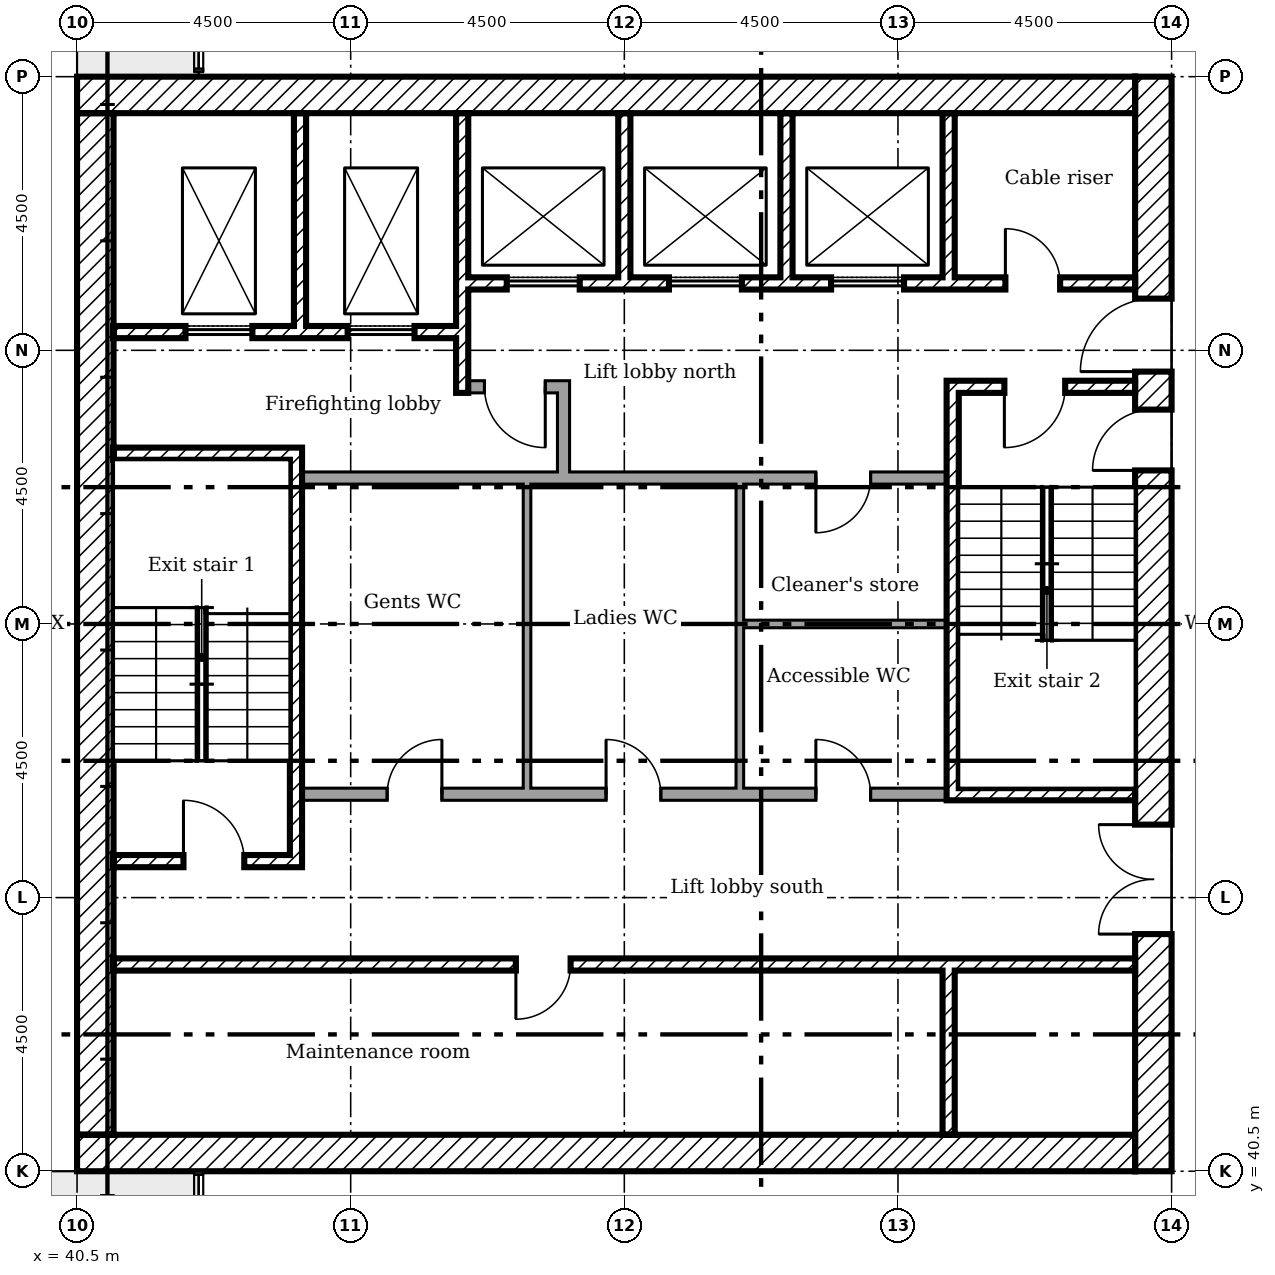
"""IFC4 building model, lengths in metres.
Left out: names, types, materials, properties, quantities, classifications, styles, units other than length and angle.
Written with IfcOpenShell. Run it as: python <this file> out.ifc"""

import sys

from ifc_helpers import new_model, si_unit, direction, frame, frame_2d, origin, place, context, subcontext, project, spatial, rectangle, extrude, element, fill, save


model = new_model("IFC4")
c1 = context("Model", 3, precision=1e-05, world=origin(), true_north=direction((0.0, 1.0)))
c2 = subcontext(c1, "Body", "Model", "MODEL_VIEW")
j1 = project(units=[si_unit("LENGTHUNIT", "METRE"), si_unit("PLANEANGLEUNIT", "RADIAN")], contexts=[c1])
p1 = place(None, origin())
s1 = spatial("IfcSite", under=j1, at=p1, CompositionType="ELEMENT")
p2 = place(p1, origin())
s2 = spatial("IfcBuilding", under=s1, at=p2, CompositionType="ELEMENT")
p3 = place(p2, frame((0.0, 0.0, 147.4)))
s3 = spatial("IfcBuildingStorey", under=s2, at=p3, CompositionType="ELEMENT", Elevation=147.4)
p4 = place(p3, frame((58.2, 40.5, 0.0), z_axis=(0.0, 0.0, 1.0), x_axis=(0.0, 1.0, 0.0)))
e1 = element("IfcWall", 1, at=p4, inside=s3, PredefinedType="SHEAR", context=c2, shape_type="SweptSolid", body=[
    extrude(rectangle(XDim=18.0, YDim=0.6, at=frame_2d((9.0, 0.0))), origin(), (0.0, 0.0, 1.0), 3.35),
])
p5 = place(p4, frame((13.15, 0.0, 0.0)))
e2 = element("IfcOpeningElement", 2, at=p5, cuts=e1, PredefinedType="OPENING", context=c2, shape_type="SweptSolid", body=[
    extrude(rectangle(XDim=1.2, YDim=2.1, at=frame_2d((0.6, 1.05))), frame((0.0, 0.31, 0.0), z_axis=(0.0, -1.0, 0.0), x_axis=(1.0, 0.0, 0.0)), (0.0, 0.0, 1.0), 0.62),
])
p6 = place(p4, frame((3.9, 0.0, 0.0)))
e3 = element("IfcOpeningElement", 3, at=p6, cuts=e1, PredefinedType="OPENING", context=c2, shape_type="SweptSolid", body=[
    extrude(rectangle(XDim=1.8, YDim=2.1, at=frame_2d((0.9, 1.05))), frame((0.0, 0.31, 0.0), z_axis=(0.0, -1.0, 0.0), x_axis=(1.0, 0.0, 0.0)), (0.0, 0.0, 1.0), 0.62),
])
p7 = place(p4, frame((11.525, 0.0, 0.0)))
e4 = element("IfcOpeningElement", 4, at=p7, cuts=e1, PredefinedType="OPENING", context=c2, shape_type="SweptSolid", body=[
    extrude(rectangle(XDim=1.0, YDim=2.1, at=frame_2d((0.5, 1.05))), frame((0.0, 0.31, 0.0), z_axis=(0.0, -1.0, 0.0), x_axis=(1.0, 0.0, 0.0)), (0.0, 0.0, 1.0), 0.62),
])
for number, where in (
    (5, (40.5, 58.2, 0.0)),
    (6, (40.5, 40.8, 0.0)),
):
    element("IfcWall", number, at=place(p3, frame(where)), inside=s3, PredefinedType="SHEAR", context=c2, shape_type="SweptSolid", body=[
        extrude(rectangle(XDim=17.4, YDim=0.6, at=frame_2d((8.7, 0.0))), origin(), (0.0, 0.0, 1.0), 3.35),
    ])
p8 = place(p3, frame((40.8, 41.1, 0.0), z_axis=(0.0, 0.0, 1.0), x_axis=(0.0, 1.0, 0.0)))
e7 = element("IfcWall", 7, at=p8, inside=s3, PredefinedType="SHEAR", context=c2, shape_type="SweptSolid", body=[
    extrude(rectangle(XDim=16.8, YDim=0.6, at=frame_2d((8.4, 0.0))), origin(), (0.0, 0.0, 1.0), 3.35),
])
p9 = place(p3, frame((44.167, 57.9, 0.0), z_axis=(0.0, 0.0, 1.0), x_axis=(0.0, -1.0, 0.0)))
e8 = element("IfcWall", 8, at=p9, inside=s3, PredefinedType="SHEAR", context=c2, shape_type="SweptSolid", body=[
    extrude(rectangle(XDim=3.5, YDim=0.2, at=frame_2d((1.75, 0.0))), origin(), (0.0, 0.0, 1.0), 3.35),
])
p10 = place(p3, frame((46.833, 57.9, 0.0), z_axis=(0.0, 0.0, 1.0), x_axis=(0.0, -1.0, 0.0)))
e9 = element("IfcWall", 9, at=p10, inside=s3, PredefinedType="SHEAR", context=c2, shape_type="SweptSolid", body=[
    extrude(rectangle(XDim=4.6, YDim=0.2, at=frame_2d((2.3, 0.0))), origin(), (0.0, 0.0, 1.0), 3.35),
])
for number, where, z_axis, x_axis in (
    (10, (49.5, 57.9, 0.0), (0.0, 0.0, 1.0), (0.0, -1.0, 0.0)),
    (11, (52.167, 57.9, 0.0), (0.0, 0.0, 1.0), (0.0, -1.0, 0.0)),
    (12, (54.833, 57.9, 0.0), (0.0, 0.0, 1.0), (0.0, -1.0, 0.0)),
    (13, (54.833, 41.1, 0.0), (0.0, 0.0, 1.0), (0.0, 1.0, 0.0)),
):
    element("IfcWall", number, at=place(p3, frame(where, z_axis=z_axis, x_axis=x_axis)), inside=s3, PredefinedType="SHEAR", context=c2, shape_type="SweptSolid", body=[
        extrude(rectangle(XDim=2.7, YDim=0.2, at=frame_2d((1.35, 0.0))), origin(), (0.0, 0.0, 1.0), 3.35),
    ])
p11 = place(p3, frame((48.5, 51.9, 0.0), z_axis=(0.0, 0.0, 1.0), x_axis=(0.0, 1.0, 0.0)))
e14 = element("IfcWall", 14, at=p11, inside=s3, PredefinedType="PARTITIONING", context=c2, shape_type="SweptSolid", body=[
    extrude(rectangle(XDim=1.6, YDim=0.2, at=frame_2d((0.8, 0.0))), origin(), (0.0, 0.0, 1.0), 3.35),
])
p12 = place(p3, frame((46.933, 53.4, 0.0)))
e15 = element("IfcWall", 15, at=p12, inside=s3, PredefinedType="PARTITIONING", context=c2, shape_type="SweptSolid", body=[
    extrude(rectangle(XDim=1.467, YDim=0.2, at=frame_2d((0.733, 0.0))), origin(), (0.0, 0.0, 1.0), 3.35),
])
p13 = place(p12, frame((0.267, 0.0, 0.0)))
e16 = element("IfcOpeningElement", 16, at=p13, cuts=e15, PredefinedType="OPENING", context=c2, shape_type="SweptSolid", body=[
    extrude(rectangle(XDim=1.0, YDim=2.1, at=frame_2d((0.5, 1.05))), frame((0.0, 0.11, 0.0), z_axis=(0.0, -1.0, 0.0), x_axis=(1.0, 0.0, 0.0)), (0.0, 0.0, 1.0), 0.22),
])
p14 = place(p3, frame((46.933, 55.1, 0.0)))
e17 = element("IfcWall", 17, at=p14, inside=s3, PredefinedType="SHEAR", context=c2, shape_type="SweptSolid", body=[
    extrude(rectangle(XDim=10.967, YDim=0.2, at=frame_2d((5.483, 0.0))), origin(), (0.0, 0.0, 1.0), 3.35),
])
p15 = place(p14, frame((8.833, 0.0, 0.0)))
e18 = element("IfcOpeningElement", 18, at=p15, cuts=e17, PredefinedType="OPENING", context=c2, shape_type="SweptSolid", body=[
    extrude(rectangle(XDim=0.9, YDim=2.1, at=frame_2d((0.45, 1.05))), frame((0.0, 0.11, 0.0), z_axis=(0.0, -1.0, 0.0), x_axis=(1.0, 0.0, 0.0)), (0.0, 0.0, 1.0), 0.22),
])
p16 = place(p14, frame((0.633, 0.0, 0.0)))
e19 = element("IfcOpeningElement", 19, at=p16, cuts=e17, PredefinedType="OPENING", context=c2, shape_type="SweptSolid", body=[
    extrude(rectangle(XDim=1.2, YDim=2.1, at=frame_2d((0.6, 1.05))), frame((0.0, 0.11, 0.0), z_axis=(0.0, -1.0, 0.0), x_axis=(1.0, 0.0, 0.0)), (0.0, 0.0, 1.0), 0.22),
])
p17 = place(p14, frame((3.3, 0.0, 0.0)))
e20 = element("IfcOpeningElement", 20, at=p17, cuts=e17, PredefinedType="OPENING", context=c2, shape_type="SweptSolid", body=[
    extrude(rectangle(XDim=1.2, YDim=2.1, at=frame_2d((0.6, 1.05))), frame((0.0, 0.11, 0.0), z_axis=(0.0, -1.0, 0.0), x_axis=(1.0, 0.0, 0.0)), (0.0, 0.0, 1.0), 0.22),
])
p18 = place(p14, frame((5.967, 0.0, 0.0)))
e21 = element("IfcOpeningElement", 21, at=p18, cuts=e17, PredefinedType="OPENING", context=c2, shape_type="SweptSolid", body=[
    extrude(rectangle(XDim=1.2, YDim=2.1, at=frame_2d((0.6, 1.05))), frame((0.0, 0.11, 0.0), z_axis=(0.0, -1.0, 0.0), x_axis=(1.0, 0.0, 0.0)), (0.0, 0.0, 1.0), 0.22),
])
p19 = place(p3, frame((41.1, 54.3, 0.0)))
e22 = element("IfcWall", 22, at=p19, inside=s3, PredefinedType="SHEAR", context=c2, shape_type="SweptSolid", body=[
    extrude(rectangle(XDim=5.633, YDim=0.2, at=frame_2d((2.817, 0.0))), origin(), (0.0, 0.0, 1.0), 3.35),
])
p20 = place(p19, frame((1.183, 0.0, 0.0)))
e23 = element("IfcOpeningElement", 23, at=p20, cuts=e22, PredefinedType="OPENING", context=c2, shape_type="SweptSolid", body=[
    extrude(rectangle(XDim=1.1, YDim=2.1, at=frame_2d((0.55, 1.05))), frame((0.0, 0.11, 0.0), z_axis=(0.0, -1.0, 0.0), x_axis=(1.0, 0.0, 0.0)), (0.0, 0.0, 1.0), 0.22),
])
p21 = place(p19, frame((3.85, 0.0, 0.0)))
e24 = element("IfcOpeningElement", 24, at=p21, cuts=e22, PredefinedType="OPENING", context=c2, shape_type="SweptSolid", body=[
    extrude(rectangle(XDim=1.1, YDim=2.1, at=frame_2d((0.55, 1.05))), frame((0.0, 0.11, 0.0), z_axis=(0.0, -1.0, 0.0), x_axis=(1.0, 0.0, 0.0)), (0.0, 0.0, 1.0), 0.22),
])
p22 = place(p3, frame((41.1, 43.9, 0.0)))
e25 = element("IfcWall", 25, at=p22, inside=s3, PredefinedType="SHEAR", context=c2, shape_type="SweptSolid", body=[
    extrude(rectangle(XDim=16.8, YDim=0.2, at=frame_2d((8.4, 0.0))), origin(), (0.0, 0.0, 1.0), 3.35),
])
p23 = place(p22, frame((6.617, 0.0, 0.0)))
e26 = element("IfcOpeningElement", 26, at=p23, cuts=e25, PredefinedType="OPENING", context=c2, shape_type="SweptSolid", body=[
    extrude(rectangle(XDim=0.9, YDim=2.1, at=frame_2d((0.45, 1.05))), frame((0.0, 0.11, 0.0), z_axis=(0.0, -1.0, 0.0), x_axis=(1.0, 0.0, 0.0)), (0.0, 0.0, 1.0), 0.22),
])
p24 = place(p3, frame((44.1, 45.5, 0.0), z_axis=(0.0, 0.0, 1.0), x_axis=(0.0, 1.0, 0.0)))
e27 = element("IfcWall", 27, at=p24, inside=s3, PredefinedType="SHEAR", context=c2, shape_type="SweptSolid", body=[
    extrude(rectangle(XDim=6.9, YDim=0.2, at=frame_2d((3.45, 0.0))), origin(), (0.0, 0.0, 1.0), 3.35),
])
p25 = place(p3, frame((41.1, 52.3, 0.0)))
e28 = element("IfcWall", 28, at=p25, inside=s3, PredefinedType="SHEAR", context=c2, shape_type="SweptSolid", body=[
    extrude(rectangle(XDim=2.9, YDim=0.2, at=frame_2d((1.45, 0.0))), origin(), (0.0, 0.0, 1.0), 3.35),
])
p26 = place(p3, frame((41.1, 45.6, 0.0)))
e29 = element("IfcWall", 29, at=p26, inside=s3, PredefinedType="SHEAR", context=c2, shape_type="SweptSolid", body=[
    extrude(rectangle(XDim=2.9, YDim=0.2, at=frame_2d((1.45, 0.0))), origin(), (0.0, 0.0, 1.0), 3.35),
])
p27 = place(p26, frame((1.15, 0.0, 0.0)))
e30 = element("IfcOpeningElement", 30, at=p27, cuts=e29, PredefinedType="OPENING", context=c2, shape_type="SweptSolid", body=[
    extrude(rectangle(XDim=1.0, YDim=2.1, at=frame_2d((0.5, 1.05))), frame((0.0, 0.11, 0.0), z_axis=(0.0, -1.0, 0.0), x_axis=(1.0, 0.0, 0.0)), (0.0, 0.0, 1.0), 0.22),
])
p28 = place(p3, frame((54.8, 53.4, 0.0)))
e31 = element("IfcWall", 31, at=p28, inside=s3, PredefinedType="SHEAR", context=c2, shape_type="SweptSolid", body=[
    extrude(rectangle(XDim=3.1, YDim=0.2, at=frame_2d((1.55, 0.0))), origin(), (0.0, 0.0, 1.0), 3.35),
])
p29 = place(p28, frame((0.95, 0.0, 0.0)))
e32 = element("IfcOpeningElement", 32, at=p29, cuts=e31, PredefinedType="OPENING", context=c2, shape_type="SweptSolid", body=[
    extrude(rectangle(XDim=1.0, YDim=2.1, at=frame_2d((0.5, 1.05))), frame((0.0, 0.11, 0.0), z_axis=(0.0, -1.0, 0.0), x_axis=(1.0, 0.0, 0.0)), (0.0, 0.0, 1.0), 0.22),
])
p30 = place(p3, frame((54.8, 46.7, 0.0)))
e33 = element("IfcWall", 33, at=p30, inside=s3, PredefinedType="SHEAR", context=c2, shape_type="SweptSolid", body=[
    extrude(rectangle(XDim=3.1, YDim=0.2, at=frame_2d((1.55, 0.0))), origin(), (0.0, 0.0, 1.0), 3.35),
])
p31 = place(p3, frame((54.9, 46.8, 0.0), z_axis=(0.0, 0.0, 1.0), x_axis=(0.0, 1.0, 0.0)))
e34 = element("IfcWall", 34, at=p31, inside=s3, PredefinedType="SHEAR", context=c2, shape_type="SweptSolid", body=[
    extrude(rectangle(XDim=6.5, YDim=0.2, at=frame_2d((3.25, 0.0))), origin(), (0.0, 0.0, 1.0), 3.35),
])
p32 = place(p3, frame((44.2, 51.9, 0.0)))
e35 = element("IfcWall", 35, at=p32, inside=s3, PredefinedType="PARTITIONING", context=c2, shape_type="SweptSolid", body=[
    extrude(rectangle(XDim=10.6, YDim=0.2, at=frame_2d((5.3, 0.0))), origin(), (0.0, 0.0, 1.0), 3.35),
])
p33 = place(p32, frame((8.45, 0.0, 0.0)))
e36 = element("IfcOpeningElement", 36, at=p33, cuts=e35, PredefinedType="OPENING", context=c2, shape_type="SweptSolid", body=[
    extrude(rectangle(XDim=0.9, YDim=2.1, at=frame_2d((0.45, 1.05))), frame((0.0, 0.11, 0.0), z_axis=(0.0, -1.0, 0.0), x_axis=(1.0, 0.0, 0.0)), (0.0, 0.0, 1.0), 0.22),
])
p34 = place(p3, frame((44.2, 46.7, 0.0)))
e37 = element("IfcWall", 37, at=p34, inside=s3, PredefinedType="PARTITIONING", context=c2, shape_type="SweptSolid", body=[
    extrude(rectangle(XDim=10.6, YDim=0.2, at=frame_2d((5.3, 0.0))), origin(), (0.0, 0.0, 1.0), 3.35),
])
p35 = place(p34, frame((1.4, 0.0, 0.0)))
e38 = element("IfcOpeningElement", 38, at=p35, cuts=e37, PredefinedType="OPENING", context=c2, shape_type="SweptSolid", body=[
    extrude(rectangle(XDim=0.9, YDim=2.1, at=frame_2d((0.45, 1.05))), frame((0.0, 0.11, 0.0), z_axis=(0.0, -1.0, 0.0), x_axis=(1.0, 0.0, 0.0)), (0.0, 0.0, 1.0), 0.22),
])
p36 = place(p34, frame((5.0, 0.0, 0.0)))
e39 = element("IfcOpeningElement", 39, at=p36, cuts=e37, PredefinedType="OPENING", context=c2, shape_type="SweptSolid", body=[
    extrude(rectangle(XDim=0.9, YDim=2.1, at=frame_2d((0.45, 1.05))), frame((0.0, 0.11, 0.0), z_axis=(0.0, -1.0, 0.0), x_axis=(1.0, 0.0, 0.0)), (0.0, 0.0, 1.0), 0.22),
])
p37 = place(p34, frame((8.45, 0.0, 0.0)))
e40 = element("IfcOpeningElement", 40, at=p37, cuts=e37, PredefinedType="OPENING", context=c2, shape_type="SweptSolid", body=[
    extrude(rectangle(XDim=0.9, YDim=2.1, at=frame_2d((0.45, 1.05))), frame((0.0, 0.11, 0.0), z_axis=(0.0, -1.0, 0.0), x_axis=(1.0, 0.0, 0.0)), (0.0, 0.0, 1.0), 0.22),
])
p38 = place(p3, frame((47.9, 46.8, 0.0), z_axis=(0.0, 0.0, 1.0), x_axis=(0.0, 1.0, 0.0)))
e41 = element("IfcWall", 41, at=p38, inside=s3, PredefinedType="PARTITIONING", context=c2, shape_type="SweptSolid", body=[
    extrude(rectangle(XDim=5.0, YDim=0.125, at=frame_2d((2.5, 0.0))), origin(), (0.0, 0.0, 1.0), 3.35),
])
p39 = place(p3, frame((51.4, 46.8, 0.0), z_axis=(0.0, 0.0, 1.0), x_axis=(0.0, 1.0, 0.0)))
e42 = element("IfcWall", 42, at=p39, inside=s3, PredefinedType="PARTITIONING", context=c2, shape_type="SweptSolid", body=[
    extrude(rectangle(XDim=2.762, YDim=0.125, at=frame_2d((1.381, 0.0))), origin(), (0.0, 0.0, 1.0), 3.35),
])
p40 = place(p3, frame((54.8, 49.5, 0.0), z_axis=(0.0, 0.0, 1.0), x_axis=(-1.0, 0.0, 0.0)))
e43 = element("IfcWall", 43, at=p40, inside=s3, PredefinedType="PARTITIONING", context=c2, shape_type="SweptSolid", body=[
    extrude(rectangle(XDim=3.338, YDim=0.125, at=frame_2d((1.669, 0.0))), origin(), (0.0, 0.0, 1.0), 3.35),
])
p41 = place(p3, frame((51.4, 49.5, 0.0), z_axis=(0.0, 0.0, 1.0), x_axis=(0.0, 1.0, 0.0)))
e44 = element("IfcWall", 44, at=p41, inside=s3, PredefinedType="PARTITIONING", context=c2, shape_type="SweptSolid", body=[
    extrude(rectangle(XDim=2.3, YDim=0.125, at=frame_2d((1.15, 0.0))), origin(), (0.0, 0.0, 1.0), 3.35),
])
p42 = place(p5, origin())
e45 = element("IfcDoor", 45, at=p42, inside=s3, OperationType="SINGLE_SWING_RIGHT", PredefinedType="DOOR", context=c2, shape_type="SweptSolid", body=[
    extrude(rectangle(XDim=1.2, YDim=2.1, at=frame_2d((0.6, 1.05))), frame((0.0, 0.025, 0.0), z_axis=(0.0, -1.0, 0.0), x_axis=(1.0, 0.0, 0.0)), (0.0, 0.0, 1.0), 0.05),
])
fill(e2, e45)
p43 = place(p6, origin())
e46 = element("IfcDoor", 46, at=p43, inside=s3, OperationType="DOUBLE_DOOR_SINGLE_SWING", PredefinedType="DOOR", context=c2, shape_type="SweptSolid", body=[
    extrude(rectangle(XDim=1.8, YDim=2.1, at=frame_2d((0.9, 1.05))), frame((0.0, 0.025, 0.0), z_axis=(0.0, -1.0, 0.0), x_axis=(1.0, 0.0, 0.0)), (0.0, 0.0, 1.0), 0.05),
])
fill(e3, e46)
p44 = place(p27, origin())
e47 = element("IfcDoor", 47, at=p44, inside=s3, OperationType="SINGLE_SWING_RIGHT", PredefinedType="DOOR", context=c2, shape_type="SweptSolid", body=[
    extrude(rectangle(XDim=1.0, YDim=2.1, at=frame_2d((0.5, 1.05))), frame((0.0, 0.025, 0.0), z_axis=(0.0, -1.0, 0.0), x_axis=(1.0, 0.0, 0.0)), (0.0, 0.0, 1.0), 0.05),
])
fill(e30, e47)
p45 = place(p29, frame((1.0, 0.0, 0.0), x_axis=(-1.0, 0.0, 0.0)))
e48 = element("IfcDoor", 48, at=p45, inside=s3, OperationType="SINGLE_SWING_LEFT", PredefinedType="DOOR", context=c2, shape_type="SweptSolid", body=[
    extrude(rectangle(XDim=1.0, YDim=2.1, at=frame_2d((0.5, 1.05))), frame((0.0, 0.025, 0.0), z_axis=(0.0, -1.0, 0.0), x_axis=(1.0, 0.0, 0.0)), (0.0, 0.0, 1.0), 0.05),
])
fill(e32, e48)
p46 = place(p7, origin())
e49 = element("IfcDoor", 49, at=p46, inside=s3, OperationType="SINGLE_SWING_RIGHT", PredefinedType="DOOR", context=c2, shape_type="SweptSolid", body=[
    extrude(rectangle(XDim=1.0, YDim=2.1, at=frame_2d((0.5, 1.05))), frame((0.0, 0.025, 0.0), z_axis=(0.0, -1.0, 0.0), x_axis=(1.0, 0.0, 0.0)), (0.0, 0.0, 1.0), 0.05),
])
fill(e4, e49)
p47 = place(p13, frame((1.0, 0.0, 0.0), x_axis=(-1.0, 0.0, 0.0)))
e50 = element("IfcDoor", 50, at=p47, inside=s3, OperationType="SINGLE_SWING_RIGHT", PredefinedType="DOOR", context=c2, shape_type="SweptSolid", body=[
    extrude(rectangle(XDim=1.0, YDim=2.1, at=frame_2d((0.5, 1.05))), frame((0.0, 0.025, 0.0), z_axis=(0.0, -1.0, 0.0), x_axis=(1.0, 0.0, 0.0)), (0.0, 0.0, 1.0), 0.05),
])
fill(e16, e50)
p48 = place(p15, origin())
e51 = element("IfcDoor", 51, at=p48, inside=s3, OperationType="SINGLE_SWING_RIGHT", PredefinedType="DOOR", context=c2, shape_type="SweptSolid", body=[
    extrude(rectangle(XDim=0.9, YDim=2.1, at=frame_2d((0.45, 1.05))), frame((0.0, 0.025, 0.0), z_axis=(0.0, -1.0, 0.0), x_axis=(1.0, 0.0, 0.0)), (0.0, 0.0, 1.0), 0.05),
])
fill(e18, e51)
p49 = place(p23, frame((0.9, 0.0, 0.0), x_axis=(-1.0, 0.0, 0.0)))
e52 = element("IfcDoor", 52, at=p49, inside=s3, OperationType="SINGLE_SWING_LEFT", PredefinedType="DOOR", context=c2, shape_type="SweptSolid", body=[
    extrude(rectangle(XDim=0.9, YDim=2.1, at=frame_2d((0.45, 1.05))), frame((0.0, 0.025, 0.0), z_axis=(0.0, -1.0, 0.0), x_axis=(1.0, 0.0, 0.0)), (0.0, 0.0, 1.0), 0.05),
])
fill(e26, e52)
p50 = place(p35, origin())
e53 = element("IfcDoor", 53, at=p50, inside=s3, OperationType="SINGLE_SWING_LEFT", PredefinedType="DOOR", context=c2, shape_type="SweptSolid", body=[
    extrude(rectangle(XDim=0.9, YDim=2.1, at=frame_2d((0.45, 1.05))), frame((0.0, 0.025, 0.0), z_axis=(0.0, -1.0, 0.0), x_axis=(1.0, 0.0, 0.0)), (0.0, 0.0, 1.0), 0.05),
])
fill(e38, e53)
p51 = place(p36, origin())
e54 = element("IfcDoor", 54, at=p51, inside=s3, OperationType="SINGLE_SWING_RIGHT", PredefinedType="DOOR", context=c2, shape_type="SweptSolid", body=[
    extrude(rectangle(XDim=0.9, YDim=2.1, at=frame_2d((0.45, 1.05))), frame((0.0, 0.025, 0.0), z_axis=(0.0, -1.0, 0.0), x_axis=(1.0, 0.0, 0.0)), (0.0, 0.0, 1.0), 0.05),
])
fill(e39, e54)
p52 = place(p37, origin())
e55 = element("IfcDoor", 55, at=p52, inside=s3, OperationType="SINGLE_SWING_RIGHT", PredefinedType="DOOR", context=c2, shape_type="SweptSolid", body=[
    extrude(rectangle(XDim=0.9, YDim=2.1, at=frame_2d((0.45, 1.05))), frame((0.0, 0.025, 0.0), z_axis=(0.0, -1.0, 0.0), x_axis=(1.0, 0.0, 0.0)), (0.0, 0.0, 1.0), 0.05),
])
fill(e40, e55)
p53 = place(p33, frame((0.9, 0.0, 0.0), x_axis=(-1.0, 0.0, 0.0)))
e56 = element("IfcDoor", 56, at=p53, inside=s3, OperationType="SINGLE_SWING_LEFT", PredefinedType="DOOR", context=c2, shape_type="SweptSolid", body=[
    extrude(rectangle(XDim=0.9, YDim=2.1, at=frame_2d((0.45, 1.05))), frame((0.0, 0.025, 0.0), z_axis=(0.0, -1.0, 0.0), x_axis=(1.0, 0.0, 0.0)), (0.0, 0.0, 1.0), 0.05),
])
fill(e36, e56)
p54 = place(p20, origin())
e57 = element("IfcDoor", 57, at=p54, inside=s3, OperationType="SLIDING_TO_LEFT", PredefinedType="DOOR", context=c2, shape_type="SweptSolid", body=[
    extrude(rectangle(XDim=1.1, YDim=2.1, at=frame_2d((0.55, 1.05))), frame((0.0, 0.025, 0.0), z_axis=(0.0, -1.0, 0.0), x_axis=(1.0, 0.0, 0.0)), (0.0, 0.0, 1.0), 0.05),
])
fill(e23, e57)
p55 = place(p21, origin())
e58 = element("IfcDoor", 58, at=p55, inside=s3, OperationType="SLIDING_TO_LEFT", PredefinedType="DOOR", context=c2, shape_type="SweptSolid", body=[
    extrude(rectangle(XDim=1.1, YDim=2.1, at=frame_2d((0.55, 1.05))), frame((0.0, 0.025, 0.0), z_axis=(0.0, -1.0, 0.0), x_axis=(1.0, 0.0, 0.0)), (0.0, 0.0, 1.0), 0.05),
])
fill(e24, e58)
p56 = place(p16, origin())
e59 = element("IfcDoor", 59, at=p56, inside=s3, OperationType="SLIDING_TO_LEFT", PredefinedType="DOOR", context=c2, shape_type="SweptSolid", body=[
    extrude(rectangle(XDim=1.2, YDim=2.1, at=frame_2d((0.6, 1.05))), frame((0.0, 0.025, 0.0), z_axis=(0.0, -1.0, 0.0), x_axis=(1.0, 0.0, 0.0)), (0.0, 0.0, 1.0), 0.05),
])
fill(e19, e59)
p57 = place(p17, origin())
e60 = element("IfcDoor", 60, at=p57, inside=s3, OperationType="SLIDING_TO_LEFT", PredefinedType="DOOR", context=c2, shape_type="SweptSolid", body=[
    extrude(rectangle(XDim=1.2, YDim=2.1, at=frame_2d((0.6, 1.05))), frame((0.0, 0.025, 0.0), z_axis=(0.0, -1.0, 0.0), x_axis=(1.0, 0.0, 0.0)), (0.0, 0.0, 1.0), 0.05),
])
fill(e20, e60)
p58 = place(p18, origin())
e61 = element("IfcDoor", 61, at=p58, inside=s3, OperationType="SLIDING_TO_LEFT", PredefinedType="DOOR", context=c2, shape_type="SweptSolid", body=[
    extrude(rectangle(XDim=1.2, YDim=2.1, at=frame_2d((0.6, 1.05))), frame((0.0, 0.025, 0.0), z_axis=(0.0, -1.0, 0.0), x_axis=(1.0, 0.0, 0.0)), (0.0, 0.0, 1.0), 0.05),
])
fill(e21, e61)
save(model, sys.argv[1])
